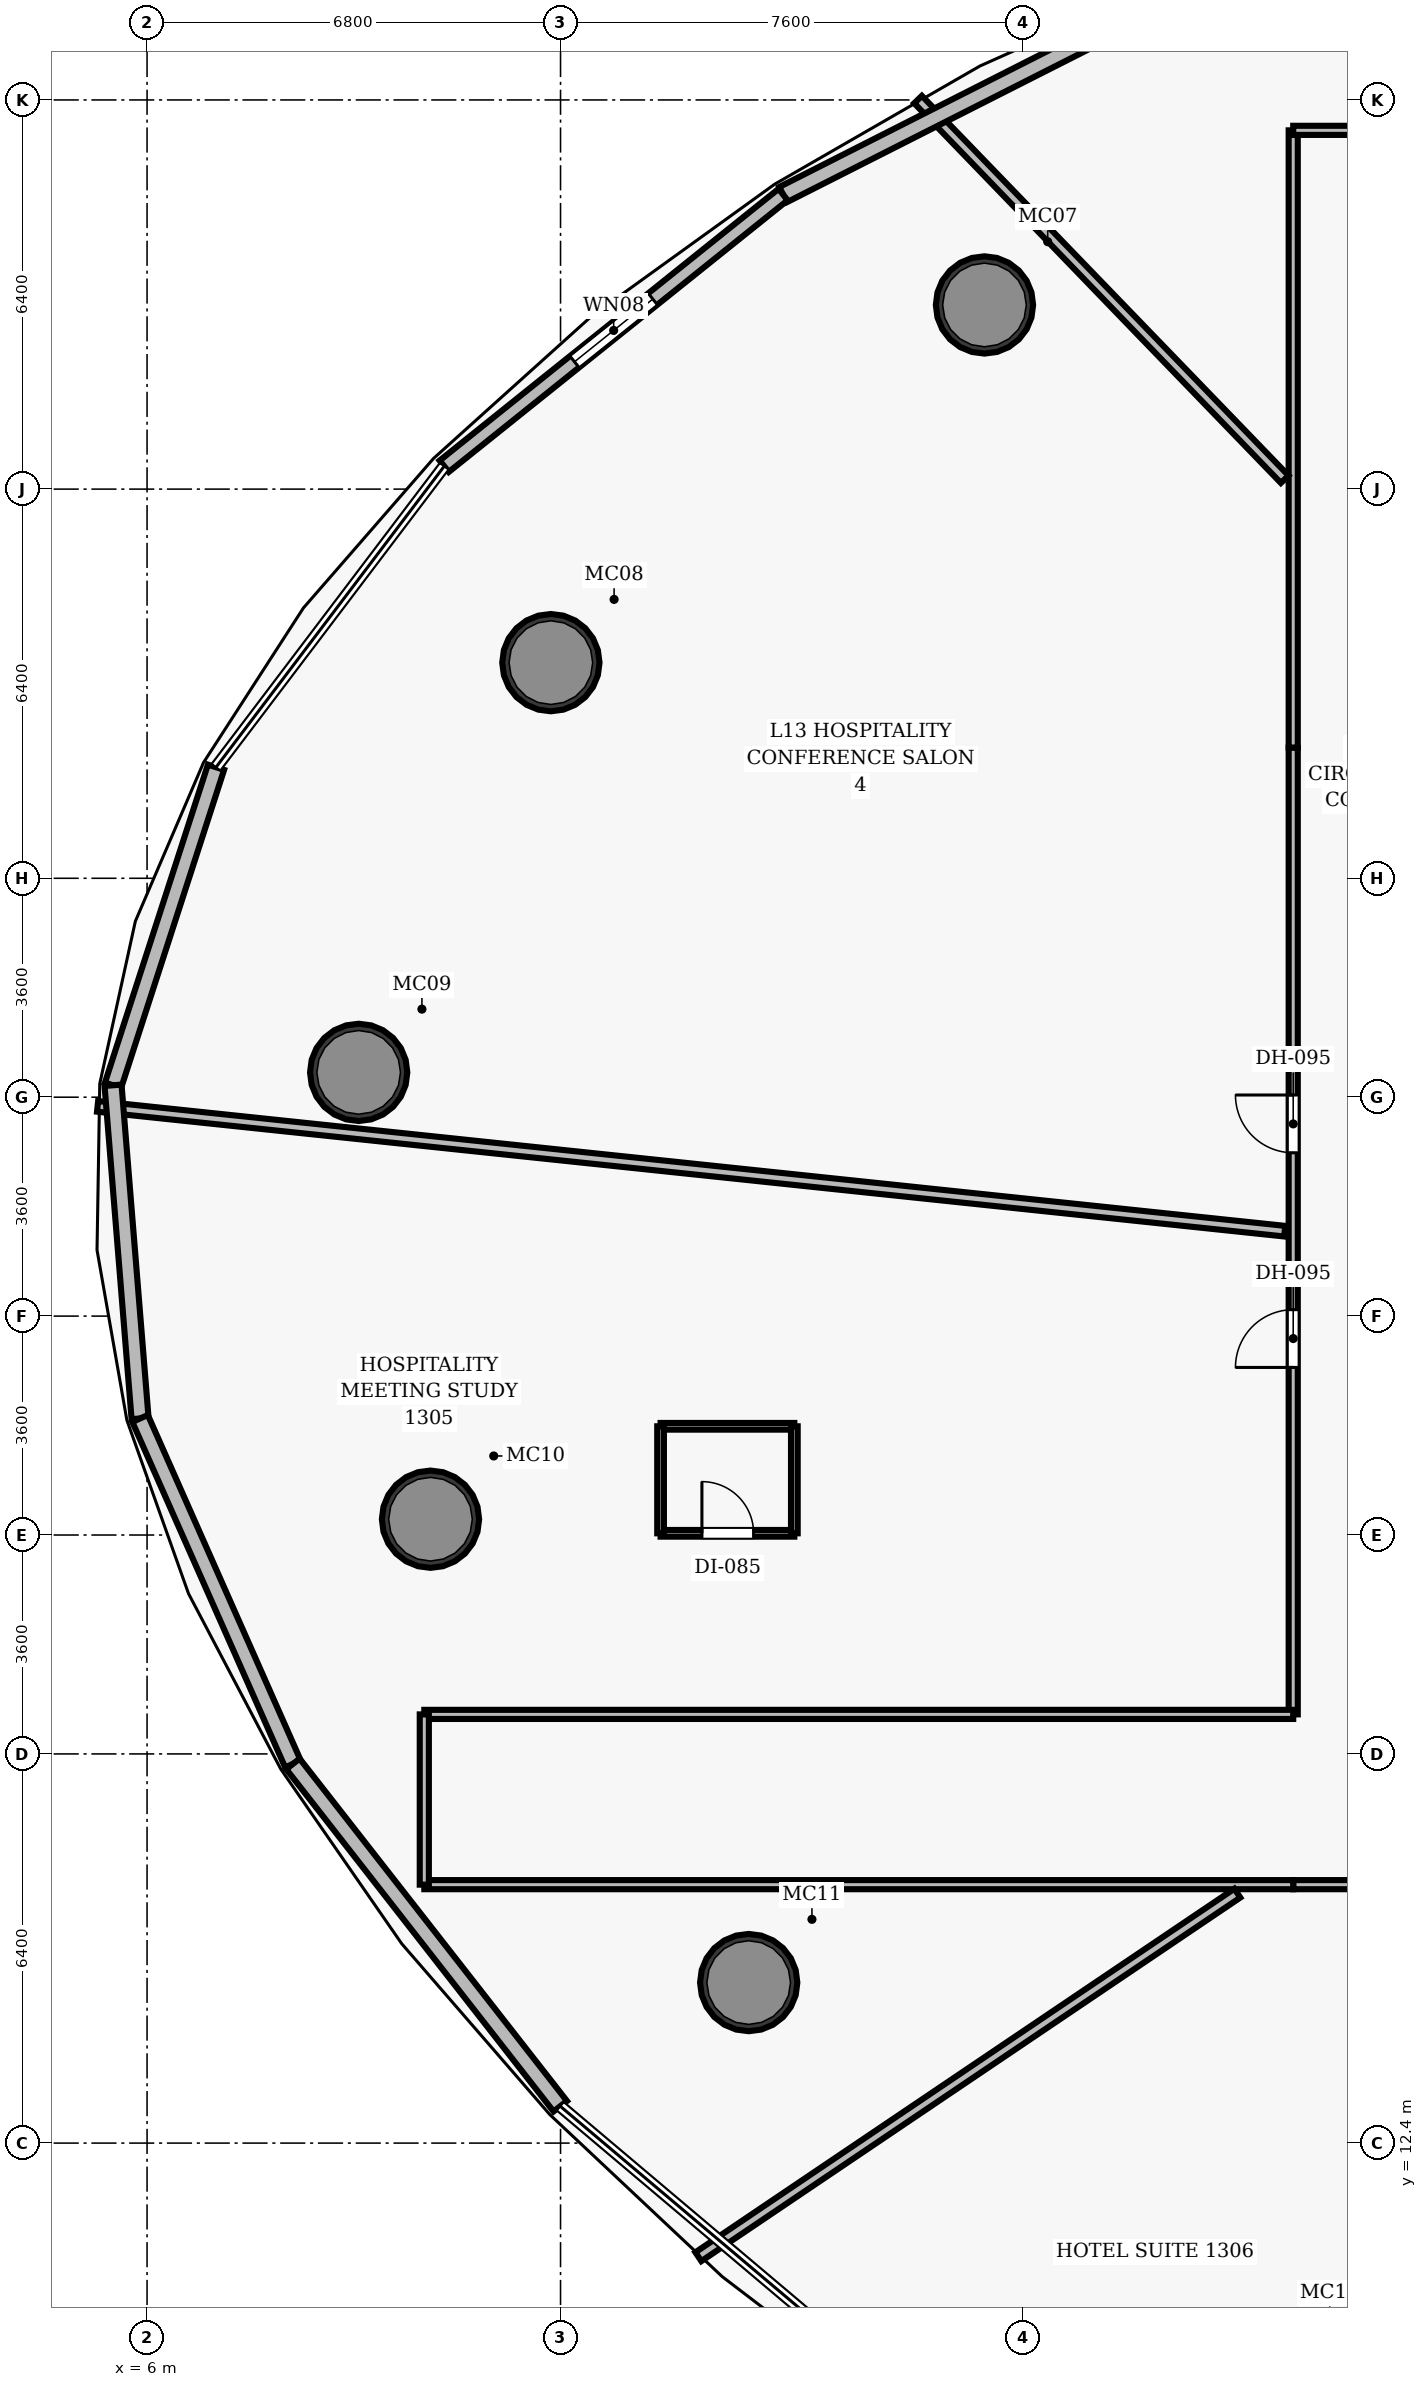
"""IFC4 building model, lengths in metres.
Left out: names, types, materials, properties, quantities, classifications, styles, units other than length and angle.
Written with IfcOpenShell. Run it as: python <this file> out.ifc"""

import sys

from ifc_helpers import new_model, si_unit, direction, frame, frame_2d, origin, origin_2d, place, context, subcontext, project, spatial, rectangle, hollow_circle, extrude, element, fill, save


model = new_model("IFC4")
c1 = context("Model", 3, precision=1e-05, world=origin(), true_north=direction((0.0, 1.0)))
c2 = subcontext(c1, "Body", "Model", "MODEL_VIEW")
j1 = project(units=[si_unit("LENGTHUNIT", "METRE"), si_unit("PLANEANGLEUNIT", "RADIAN")], contexts=[c1])
p1 = place(None, origin())
s1 = spatial("IfcSite", under=j1, at=p1, CompositionType="ELEMENT")
p2 = place(p1, origin())
s2 = spatial("IfcBuilding", under=s1, at=p2, CompositionType="ELEMENT")
p3 = place(p2, frame((0.0, 0.0, 62.4)))
s3 = spatial("IfcBuildingStorey", under=s2, at=p3, CompositionType="ELEMENT", Elevation=62.4)
for number, where, z_axis, x_axis in (
    (1, (19.772, 42.629, 0.0), (0.0, 0.0, 1.0), (1.0, 0.0, 0.0)),
    (2, (12.641, 36.746, 0.0), (0.0, 0.0, 1.0), (1.0, 0.0, 0.0)),
    (3, (9.48, 30.008, 0.0), (0.0, 0.0, 1.0), (1.0, 0.0, 0.0)),
    (4, (10.661, 22.66, 0.0), (0.0, 0.0, 1.0), (1.0, 0.0, 0.0)),
    (5, (15.895, 15.04, 0.0), (0.0, 0.0, 1.0), (1.0, 0.0, 0.0)),
):
    element("IfcColumn", number, at=place(p3, frame(where, z_axis=z_axis, x_axis=x_axis)), inside=s3, PredefinedType="COLUMN", context=c2, shape_type="SweptSolid", body=[
        extrude(hollow_circle(Radius=0.8, WallThickness=0.06, at=origin_2d()), origin(), (0.0, 0.0, 1.0), 3.5),
    ])
p4 = place(p3, frame((24.85, 16.65, 0.0), z_axis=(0.0, 0.0, 1.0), x_axis=(1.0, 0.0, 0.0)))
e6 = element("IfcWall", 6, at=p4, inside=s3, PredefinedType="PARTITIONING", context=c2, shape_type="SweptSolid", body=[
    extrude(rectangle(XDim=23.5, YDim=0.15, at=frame_2d((11.75, 0.0))), origin(), (0.0, 0.0, 1.0), 2.6),
])
p5 = place(p4, frame((7.573, 0.0, 0.0)))
e7 = element("IfcOpeningElement", 7, at=p5, cuts=e6, PredefinedType="OPENING", context=c2, shape_type="SweptSolid", body=[
    extrude(rectangle(XDim=0.95, YDim=2.15, at=frame_2d((0.475, 1.075))), frame((0.0, 0.085, 0.0), z_axis=(0.0, -1.0, 0.0), x_axis=(1.0, 0.0, 0.0)), (0.0, 0.0, 1.0), 0.17),
])
p6 = place(p4, frame((11.544, 0.0, 0.0)))
e8 = element("IfcOpeningElement", 8, at=p6, cuts=e6, PredefinedType="OPENING", context=c2, shape_type="SweptSolid", body=[
    extrude(rectangle(XDim=0.95, YDim=2.15, at=frame_2d((0.475, 1.075))), frame((0.0, 0.085, 0.0), z_axis=(0.0, -1.0, 0.0), x_axis=(1.0, 0.0, 0.0)), (0.0, 0.0, 1.0), 0.17),
])
p7 = place(p4, frame((18.202, 0.0, 0.0)))
e9 = element("IfcOpeningElement", 9, at=p7, cuts=e6, PredefinedType="OPENING", context=c2, shape_type="SweptSolid", body=[
    extrude(rectangle(XDim=0.95, YDim=2.15, at=frame_2d((0.475, 1.075))), frame((0.0, 0.085, 0.0), z_axis=(0.0, -1.0, 0.0), x_axis=(1.0, 0.0, 0.0)), (0.0, 0.0, 1.0), 0.17),
])
p8 = place(p3, frame((24.85, 19.45, 0.0), z_axis=(0.0, 0.0, 1.0), x_axis=(0.0, 1.0, 0.0)))
e10 = element("IfcWall", 10, at=p8, inside=s3, PredefinedType="PARTITIONING", context=c2, shape_type="SweptSolid", body=[
    extrude(rectangle(XDim=15.9, YDim=0.15, at=frame_2d((7.95, 0.0))), origin(), (0.0, 0.0, 1.0), 2.6),
])
p9 = place(p8, frame((9.236, 0.0, 0.0)))
e11 = element("IfcOpeningElement", 11, at=p9, cuts=e10, PredefinedType="OPENING", context=c2, shape_type="SweptSolid", body=[
    extrude(rectangle(XDim=0.95, YDim=2.15, at=frame_2d((0.475, 1.075))), frame((0.0, 0.085, 0.0), z_axis=(0.0, -1.0, 0.0), x_axis=(1.0, 0.0, 0.0)), (0.0, 0.0, 1.0), 0.17),
])
p10 = place(p8, frame((5.706, 0.0, 0.0)))
e12 = element("IfcOpeningElement", 12, at=p10, cuts=e10, PredefinedType="OPENING", context=c2, shape_type="SweptSolid", body=[
    extrude(rectangle(XDim=0.95, YDim=2.15, at=frame_2d((0.475, 1.075))), frame((0.0, 0.085, 0.0), z_axis=(0.0, -1.0, 0.0), x_axis=(1.0, 0.0, 0.0)), (0.0, 0.0, 1.0), 0.17),
])
for number, where, z_axis, x_axis in (
    (13, (10.56, 19.45, 0.0), (0.0, 0.0, 1.0), (1.0, 0.0, 0.0)),
    (14, (10.56, 16.65, 0.0), (0.0, 0.0, 1.0), (1.0, 0.0, 0.0)),
):
    element("IfcWall", number, at=place(p3, frame(where, z_axis=z_axis, x_axis=x_axis)), inside=s3, PredefinedType="PARTITIONING", context=c2, shape_type="SweptSolid", body=[
        extrude(rectangle(XDim=14.291, YDim=0.15, at=frame_2d((7.145, 0.0))), origin(), (0.0, 0.0, 1.0), 2.6),
    ])
p11 = place(p3, frame((10.56, 16.65, 0.0), z_axis=(0.0, 0.0, 1.0), x_axis=(0.0, 1.0, 0.0)))
e15 = element("IfcWall", 15, at=p11, inside=s3, PredefinedType="PARTITIONING", context=c2, shape_type="SweptSolid", body=[
    extrude(rectangle(XDim=2.8, YDim=0.15, at=frame_2d((1.4, 0.0))), origin(), (0.0, 0.0, 1.0), 2.6),
])
p12 = place(p3, frame((24.85, 35.35, 0.0), z_axis=(0.0, 0.0, 1.0), x_axis=(0.0, 1.0, 0.0)))
e16 = element("IfcWall", 16, at=p12, inside=s3, PredefinedType="PARTITIONING", context=c2, shape_type="SweptSolid", body=[
    extrude(rectangle(XDim=10.15, YDim=0.15, at=frame_2d((5.075, 0.0))), origin(), (0.0, 0.0, 1.0), 2.6),
])
p13 = place(p3, frame((24.85, 45.5, 0.0), z_axis=(0.0, 0.0, 1.0), x_axis=(1.0, 0.0, 0.0)))
e17 = element("IfcWall", 17, at=p13, inside=s3, PredefinedType="PARTITIONING", context=c2, shape_type="SweptSolid", body=[
    extrude(rectangle(XDim=2.8, YDim=0.15, at=frame_2d((1.4, 0.0))), origin(), (0.0, 0.0, 1.0), 2.6),
])
p14 = place(p3, frame((24.71, 39.762, 0.0), z_axis=(0.0, 0.0, 1.0), x_axis=(-0.694652731588, 0.71934524569, 0.0)))
e18 = element("IfcWall", 18, at=p14, inside=s3, PredefinedType="PARTITIONING", context=c2, shape_type="SweptSolid", body=[
    extrude(rectangle(XDim=8.681, YDim=0.175, at=frame_2d((4.34, 0.0))), origin(), (0.0, 0.0, 1.0), 2.6),
])
p15 = place(p3, frame((24.71, 27.397, 0.0), z_axis=(0.0, 0.0, 1.0), x_axis=(-0.994520842573, 0.104538479463, 0.0)))
e19 = element("IfcWall", 19, at=p15, inside=s3, PredefinedType="PARTITIONING", context=c2, shape_type="SweptSolid", body=[
    extrude(rectangle(XDim=19.632, YDim=0.175, at=frame_2d((9.816, 0.0))), origin(), (0.0, 0.0, 1.0), 2.6),
])
p16 = place(p3, frame((23.93, 16.51, 0.0), z_axis=(0.0, 0.0, 1.0), x_axis=(-0.829034462521, -0.559197514259, 0.0)))
e20 = element("IfcWall", 20, at=p16, inside=s3, PredefinedType="PARTITIONING", context=c2, shape_type="SweptSolid", body=[
    extrude(rectangle(XDim=10.692, YDim=0.175, at=frame_2d((5.346, 0.0))), origin(), (0.0, 0.0, 1.0), 2.6),
])
p17 = place(p3, frame((14.445, 22.428, 0.0), z_axis=(0.0, 0.0, 1.0), x_axis=(1.0, 0.0, 0.0)))
e21 = element("IfcWall", 21, at=p17, inside=s3, PredefinedType="PARTITIONING", context=c2, shape_type="SweptSolid", body=[
    extrude(rectangle(XDim=2.2, YDim=0.11, at=frame_2d((1.1, 0.0))), origin(), (0.0, 0.0, 1.0), 2.6),
])
p18 = place(p17, frame((0.68, 0.0, 0.0)))
e22 = element("IfcOpeningElement", 22, at=p18, cuts=e21, PredefinedType="OPENING", context=c2, shape_type="SweptSolid", body=[
    extrude(rectangle(XDim=0.85, YDim=2.1, at=frame_2d((0.425, 1.05))), frame((0.0, 0.065, 0.0), z_axis=(0.0, -1.0, 0.0), x_axis=(1.0, 0.0, 0.0)), (0.0, 0.0, 1.0), 0.13),
])
p19 = place(p3, frame((14.445, 24.188, 0.0), z_axis=(0.0, 0.0, 1.0), x_axis=(1.0, 0.0, 0.0)))
e23 = element("IfcWall", 23, at=p19, inside=s3, PredefinedType="PARTITIONING", context=c2, shape_type="SweptSolid", body=[
    extrude(rectangle(XDim=2.2, YDim=0.11, at=frame_2d((1.1, 0.0))), origin(), (0.0, 0.0, 1.0), 2.6),
])
for number, where, z_axis, x_axis in (
    (24, (14.445, 22.428, 0.0), (0.0, 0.0, 1.0), (0.0, 1.0, 0.0)),
    (25, (16.645, 22.428, 0.0), (0.0, 0.0, 1.0), (0.0, 1.0, 0.0)),
):
    element("IfcWall", number, at=place(p3, frame(where, z_axis=z_axis, x_axis=x_axis)), inside=s3, PredefinedType="PARTITIONING", context=c2, shape_type="SweptSolid", body=[
        extrude(rectangle(XDim=1.76, YDim=0.11, at=frame_2d((0.88, 0.0))), origin(), (0.0, 0.0, 1.0), 2.6),
    ])
p20 = place(p3, frame((16.46, 44.444, 0.0), z_axis=(0.0, 0.0, 1.0), x_axis=(0.892062039894, 0.451912952878, 0.0)))
e26 = element("IfcWall", 26, at=p20, inside=s3, PredefinedType="SOLIDWALL", context=c2, shape_type="SweptSolid", body=[
    extrude(rectangle(XDim=7.845, YDim=0.28, at=frame_2d((3.922, 0.0))), origin(), (0.0, 0.0, 1.0), 3.25),
])
p21 = place(p3, frame((10.887, 39.976, 0.0), z_axis=(0.0, 0.0, 1.0), x_axis=(0.780288251462, 0.625420054547, 0.0)))
e27 = element("IfcWall", 27, at=p21, inside=s3, PredefinedType="SOLIDWALL", context=c2, shape_type="SweptSolid", body=[
    extrude(rectangle(XDim=7.143, YDim=0.24, at=frame_2d((3.571, 0.0))), origin(), (0.0, 0.0, 1.0), 3.25),
])
p22 = place(p21, frame((2.746, 0.0, 0.85)))
e28 = element("IfcOpeningElement", 28, at=p22, cuts=e27, PredefinedType="OPENING", context=c2, shape_type="SweptSolid", body=[
    extrude(rectangle(XDim=1.65, YDim=1.95, at=frame_2d((0.825, 0.975))), frame((0.0, 0.13, 0.0), z_axis=(0.0, -1.0, 0.0), x_axis=(1.0, 0.0, 0.0)), (0.0, 0.0, 1.0), 0.26),
])
p23 = place(p3, frame((5.44, 29.796, 0.0), z_axis=(0.0, 0.0, 1.0), x_axis=(0.308035481902, 0.951374869276, 0.0)))
e29 = element("IfcWall", 29, at=p23, inside=s3, PredefinedType="SOLIDWALL", context=c2, shape_type="SweptSolid", body=[
    extrude(rectangle(XDim=5.497, YDim=0.28, at=frame_2d((2.749, 0.0))), origin(), (0.0, 0.0, 1.0), 3.25),
])
p24 = place(p3, frame((5.885, 24.317, 0.0), z_axis=(0.0, 0.0, 1.0), x_axis=(-0.080869527328, 0.996724695967, 0.0)))
e30 = element("IfcWall", 30, at=p24, inside=s3, PredefinedType="SOLIDWALL", context=c2, shape_type="SweptSolid", body=[
    extrude(rectangle(XDim=5.498, YDim=0.28, at=frame_2d((2.749, 0.0))), origin(), (0.0, 0.0, 1.0), 3.25),
])
p25 = place(p3, frame((8.399, 18.636, 0.0), z_axis=(0.0, 0.0, 1.0), x_axis=(-0.404683001763, 0.914457034575, 0.0)))
e31 = element("IfcWall", 31, at=p25, inside=s3, PredefinedType="SOLIDWALL", context=c2, shape_type="SweptSolid", body=[
    extrude(rectangle(XDim=6.212, YDim=0.28, at=frame_2d((3.106, 0.0))), origin(), (0.0, 0.0, 1.0), 3.25),
])
p26 = place(p3, frame((12.795, 13.006, 0.0), z_axis=(0.0, 0.0, 1.0), x_axis=(-0.615498775156, 0.788137841866, 0.0)))
e32 = element("IfcWall", 32, at=p26, inside=s3, PredefinedType="SOLIDWALL", context=c2, shape_type="SweptSolid", body=[
    extrude(rectangle(XDim=7.143, YDim=0.28, at=frame_2d((3.572, 0.0))), origin(), (0.0, 0.0, 1.0), 3.25),
])
p27 = place(p9, origin())
e33 = element("IfcDoor", 33, at=p27, inside=s3, OperationType="SINGLE_SWING_RIGHT", PredefinedType="DOOR", context=c2, shape_type="SweptSolid", body=[
    extrude(rectangle(XDim=0.95, YDim=2.15, at=frame_2d((0.475, 1.075))), frame((0.0, 0.025, 0.0), z_axis=(0.0, -1.0, 0.0), x_axis=(1.0, 0.0, 0.0)), (0.0, 0.0, 1.0), 0.05),
])
fill(e11, e33)
p28 = place(p10, origin())
e34 = element("IfcDoor", 34, at=p28, inside=s3, OperationType="SINGLE_SWING_LEFT", PredefinedType="DOOR", context=c2, shape_type="SweptSolid", body=[
    extrude(rectangle(XDim=0.95, YDim=2.15, at=frame_2d((0.475, 1.075))), frame((0.0, 0.025, 0.0), z_axis=(0.0, -1.0, 0.0), x_axis=(1.0, 0.0, 0.0)), (0.0, 0.0, 1.0), 0.05),
])
fill(e12, e34)
p29 = place(p18, origin())
e35 = element("IfcDoor", 35, at=p29, inside=s3, OperationType="SINGLE_SWING_LEFT", PredefinedType="DOOR", context=c2, shape_type="SweptSolid", body=[
    extrude(rectangle(XDim=0.85, YDim=2.1, at=frame_2d((0.425, 1.05))), frame((0.0, 0.025, 0.0), z_axis=(0.0, -1.0, 0.0), x_axis=(1.0, 0.0, 0.0)), (0.0, 0.0, 1.0), 0.05),
])
fill(e22, e35)
p30 = place(p22, origin())
e36 = element("IfcWindow", 36, at=p30, inside=s3, PartitioningType="SINGLE_PANEL", PredefinedType="WINDOW", context=c2, shape_type="SweptSolid", body=[
    extrude(rectangle(XDim=1.65, YDim=1.95, at=frame_2d((0.825, 0.975))), frame((0.0, 0.03, 0.0), z_axis=(0.0, -1.0, 0.0), x_axis=(1.0, 0.0, 0.0)), (0.0, 0.0, 1.0), 0.06),
])
fill(e28, e36)
save(model, sys.argv[1])
